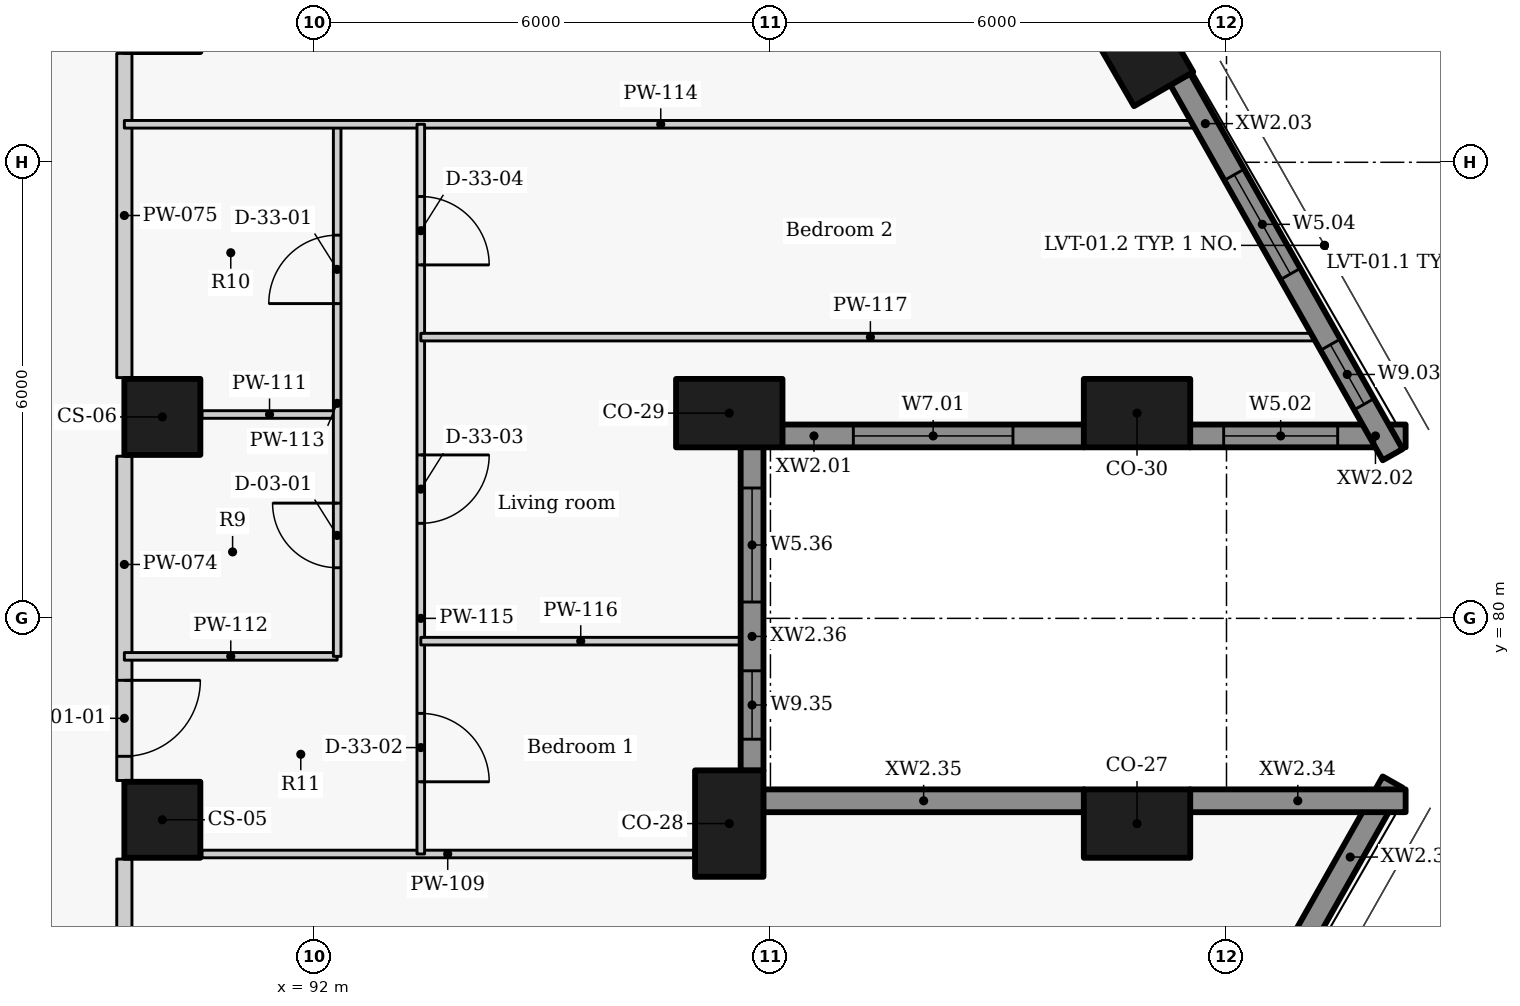
"""IFC4 building model, lengths in metres.
Left out: names, types, materials, properties, quantities, classifications, styles, units other than length and angle.
Written with IfcOpenShell. Run it as: python <this file> out.ifc"""

import sys

from ifc_helpers import new_model, si_unit, direction, frame, frame_2d, origin, origin_2d, place, context, subcontext, project, spatial, rectangle, extrude, element, fill, save


model = new_model("IFC4")
c1 = context("Model", 3, precision=1e-05, world=origin(), true_north=direction((0.0, 1.0)))
c2 = subcontext(c1, "Body", "Model", "MODEL_VIEW")
j1 = project(units=[si_unit("LENGTHUNIT", "METRE"), si_unit("PLANEANGLEUNIT", "RADIAN")], contexts=[c1])
p1 = place(None, origin())
s1 = spatial("IfcSite", under=j1, at=p1, CompositionType="ELEMENT")
p2 = place(p1, origin())
s2 = spatial("IfcBuilding", under=s1, at=p2, CompositionType="ELEMENT")
p3 = place(p2, frame((0.0, 0.0, 97.5)))
s3 = spatial("IfcBuildingStorey", under=s2, at=p3, CompositionType="ELEMENT", Elevation=97.5)
for number, where, z_axis, x_axis in (
    (1, (102.823, 77.3, 0.0), (0.0, 0.0, 1.0), (-1.0, 0.0, 0.0)),
    (2, (97.458, 77.3, 0.0), (0.0, 0.0, 1.0), (0.0, 1.0, 0.0)),
    (3, (97.458, 82.7, 0.0), (0.0, 0.0, 1.0), (1.0, 0.0, 0.0)),
    (4, (102.823, 82.7, 0.0), (0.0, 0.0, 1.0), (1.0, 0.0, 0.0)),
    (5, (102.823, 87.57, 0.0), (0.0, 0.0, 1.0), (-0.5, 0.866, 0.0)),
):
    element("IfcColumn", number, at=place(p3, frame(where, z_axis=z_axis, x_axis=x_axis)), inside=s3, PredefinedType="COLUMN", context=c2, shape_type="SweptSolid", body=[
        extrude(rectangle(XDim=1.4, YDim=0.9, at=origin_2d()), origin(), (0.0, 0.0, 1.0), 3.3),
    ])
for number, where, z_axis, x_axis in (
    (6, (90.0, 77.35, 0.0), (0.0, 0.0, 1.0), (0.0, 1.0, 0.0)),
    (7, (90.0, 82.65, 0.0), (0.0, 0.0, 1.0), (0.0, 1.0, 0.0)),
):
    element("IfcColumn", number, at=place(p3, frame(where, z_axis=z_axis, x_axis=x_axis)), inside=s3, PredefinedType="COLUMN", context=c2, shape_type="SweptSolid", body=[
        extrude(rectangle(XDim=1.0, YDim=1.0, at=origin_2d()), origin(), (0.0, 0.0, 1.0), 3.3),
    ])
p4 = place(p3, frame((98.154, 82.4, 0.0), z_axis=(0.0, 0.0, 1.0), x_axis=(1.0, 0.0, 0.0)))
e8 = element("IfcWall", 8, at=p4, inside=s3, PredefinedType="SOLIDWALL", context=c2, shape_type="SweptSolid", body=[
    extrude(rectangle(XDim=3.973, YDim=0.3, at=frame_2d((1.986, 0.0))), origin(), (0.0, 0.0, 1.0), 2.425),
])
p5 = place(p4, frame((0.936, 0.0, 0.9)))
e9 = element("IfcOpeningElement", 9, at=p5, cuts=e8, PredefinedType="OPENING", context=c2, shape_type="SweptSolid", body=[
    extrude(rectangle(XDim=2.1, YDim=1.1, at=frame_2d((1.05, 0.55))), frame((0.0, 0.16, 0.0), z_axis=(0.0, -1.0, 0.0), x_axis=(1.0, 0.0, 0.0)), (0.0, 0.0, 1.0), 0.32),
])
p6 = place(p3, frame((103.519, 82.4, 0.0), z_axis=(0.0, 0.0, 1.0), x_axis=(1.0, 0.0, 0.0)))
e10 = element("IfcWall", 10, at=p6, inside=s3, PredefinedType="SOLIDWALL", context=c2, shape_type="SweptSolid", body=[
    extrude(rectangle(XDim=2.838, YDim=0.3, at=frame_2d((1.419, 0.0))), origin(), (0.0, 0.0, 1.0), 2.425),
])
p7 = place(p6, frame((0.444, 0.0, 0.9)))
e11 = element("IfcOpeningElement", 11, at=p7, cuts=e10, PredefinedType="OPENING", context=c2, shape_type="SweptSolid", body=[
    extrude(rectangle(XDim=1.5, YDim=1.1, at=frame_2d((0.75, 0.55))), frame((0.0, 0.16, 0.0), z_axis=(0.0, -1.0, 0.0), x_axis=(1.0, 0.0, 0.0)), (0.0, 0.0, 1.0), 0.32),
])
p8 = place(p3, frame((106.186, 82.153, 0.0), z_axis=(0.0, 0.0, 1.0), x_axis=(-0.492456858874, 0.870336855561, 0.0)))
e12 = element("IfcWall", 12, at=p8, inside=s3, PredefinedType="SOLIDWALL", context=c2, shape_type="SweptSolid", body=[
    extrude(rectangle(XDim=5.677, YDim=0.3, at=frame_2d((2.838, 0.0))), origin(), (0.0, 0.0, 1.0), 2.425),
])
p9 = place(p8, frame((0.763, 0.0, 0.9)))
e13 = element("IfcOpeningElement", 13, at=p9, cuts=e12, PredefinedType="OPENING", context=c2, shape_type="SweptSolid", body=[
    extrude(rectangle(XDim=0.9, YDim=1.1, at=frame_2d((0.45, 0.55))), frame((0.0, 0.16, 0.0), z_axis=(0.0, -1.0, 0.0), x_axis=(1.0, 0.0, 0.0)), (0.0, 0.0, 1.0), 0.32),
])
p10 = place(p8, frame((2.732, 0.0, 0.9)))
e14 = element("IfcOpeningElement", 14, at=p10, cuts=e12, PredefinedType="OPENING", context=c2, shape_type="SweptSolid", body=[
    extrude(rectangle(XDim=1.5, YDim=1.1, at=frame_2d((0.75, 0.55))), frame((0.0, 0.16, 0.0), z_axis=(0.0, -1.0, 0.0), x_axis=(1.0, 0.0, 0.0)), (0.0, 0.0, 1.0), 0.32),
])
p11 = place(p3, frame((103.391, 72.906, 0.0), z_axis=(0.0, 0.0, 1.0), x_axis=(0.492456858874, 0.870336855561, 0.0)))
e15 = element("IfcWall", 15, at=p11, inside=s3, PredefinedType="SOLIDWALL", context=c2, shape_type="SweptSolid", body=[
    extrude(rectangle(XDim=5.677, YDim=0.3, at=frame_2d((2.838, 0.0))), origin(), (0.0, 0.0, 1.0), 2.425),
])
p12 = place(p11, frame((1.209, 0.0, 0.9)))
e16 = element("IfcOpeningElement", 16, at=p12, cuts=e15, PredefinedType="OPENING", context=c2, shape_type="SweptSolid", body=[
    extrude(rectangle(XDim=2.1, YDim=1.1, at=frame_2d((1.05, 0.55))), frame((0.0, 0.16, 0.0), z_axis=(0.0, -1.0, 0.0), x_axis=(1.0, 0.0, 0.0)), (0.0, 0.0, 1.0), 0.32),
])
p13 = place(p3, frame((106.357, 77.6, 0.0), z_axis=(0.0, 0.0, 1.0), x_axis=(-1.0, 0.0, 0.0)))
e17 = element("IfcWall", 17, at=p13, inside=s3, PredefinedType="SOLIDWALL", context=c2, shape_type="SweptSolid", body=[
    extrude(rectangle(XDim=2.838, YDim=0.3, at=frame_2d((1.419, 0.0))), origin(), (0.0, 0.0, 1.0), 2.425),
])
p14 = place(p3, frame((102.127, 77.6, 0.0), z_axis=(0.0, 0.0, 1.0), x_axis=(-1.0, 0.0, 0.0)))
e18 = element("IfcWall", 18, at=p14, inside=s3, PredefinedType="SOLIDWALL", context=c2, shape_type="SweptSolid", body=[
    extrude(rectangle(XDim=4.223, YDim=0.3, at=frame_2d((2.111, 0.0))), origin(), (0.0, 0.0, 1.0), 2.425),
])
p15 = place(p3, frame((97.758, 77.996, 0.0), z_axis=(0.0, 0.0, 1.0), x_axis=(0.0, 1.0, 0.0)))
e19 = element("IfcWall", 19, at=p15, inside=s3, PredefinedType="SOLIDWALL", context=c2, shape_type="SweptSolid", body=[
    extrude(rectangle(XDim=4.258, YDim=0.3, at=frame_2d((2.129, 0.0))), origin(), (0.0, 0.0, 1.0), 2.425),
])
p16 = place(p15, frame((0.414, 0.0, 0.9)))
e20 = element("IfcOpeningElement", 20, at=p16, cuts=e19, PredefinedType="OPENING", context=c2, shape_type="SweptSolid", body=[
    extrude(rectangle(XDim=0.9, YDim=1.1, at=frame_2d((0.45, 0.55))), frame((0.0, 0.16, 0.0), z_axis=(0.0, -1.0, 0.0), x_axis=(1.0, 0.0, 0.0)), (0.0, 0.0, 1.0), 0.32),
])
p17 = place(p15, frame((2.219, 0.0, 0.9)))
e21 = element("IfcOpeningElement", 21, at=p17, cuts=e19, PredefinedType="OPENING", context=c2, shape_type="SweptSolid", body=[
    extrude(rectangle(XDim=1.5, YDim=1.1, at=frame_2d((0.75, 0.55))), frame((0.0, 0.16, 0.0), z_axis=(0.0, -1.0, 0.0), x_axis=(1.0, 0.0, 0.0)), (0.0, 0.0, 1.0), 0.32),
])
p18 = place(p3, frame((89.5, 76.833, 0.0), z_axis=(0.0, 0.0, 1.0), x_axis=(0.0, -1.0, 0.0)))
e22 = element("IfcWall", 22, at=p18, inside=s3, PredefinedType="PARTITIONING", context=c2, shape_type="SweptSolid", body=[
    extrude(rectangle(XDim=4.266, YDim=0.2, at=frame_2d((2.133, 0.0))), origin(), (0.0, 0.0, 1.0), 3.025),
])
p19 = place(p18, frame((1.633, 0.0, 0.0)))
e23 = element("IfcOpeningElement", 23, at=p19, cuts=e22, PredefinedType="OPENING", context=c2, shape_type="SweptSolid", body=[
    extrude(rectangle(XDim=1.0, YDim=2.1, at=frame_2d((0.5, 1.05))), frame((0.0, 0.11, 0.0), z_axis=(0.0, -1.0, 0.0), x_axis=(1.0, 0.0, 0.0)), (0.0, 0.0, 1.0), 0.22),
])
p20 = place(p3, frame((89.5, 82.133, 0.0), z_axis=(0.0, 0.0, 1.0), x_axis=(0.0, -1.0, 0.0)))
e24 = element("IfcWall", 24, at=p20, inside=s3, PredefinedType="PARTITIONING", context=c2, shape_type="SweptSolid", body=[
    extrude(rectangle(XDim=4.266, YDim=0.2, at=frame_2d((2.133, 0.0))), origin(), (0.0, 0.0, 1.0), 3.025),
])
p21 = place(p20, frame((2.948, 0.0, 0.0)))
e25 = element("IfcOpeningElement", 25, at=p21, cuts=e24, PredefinedType="OPENING", context=c2, shape_type="SweptSolid", body=[
    extrude(rectangle(XDim=1.0, YDim=2.1, at=frame_2d((0.5, 1.05))), frame((0.0, 0.11, 0.0), z_axis=(0.0, -1.0, 0.0), x_axis=(1.0, 0.0, 0.0)), (0.0, 0.0, 1.0), 0.22),
])
p22 = place(p3, frame((89.5, 83.167, 0.0), z_axis=(0.0, 0.0, 1.0), x_axis=(0.0, 1.0, 0.0)))
e26 = element("IfcWall", 26, at=p22, inside=s3, PredefinedType="PARTITIONING", context=c2, shape_type="SweptSolid", body=[
    extrude(rectangle(XDim=4.266, YDim=0.2, at=frame_2d((2.133, 0.0))), origin(), (0.0, 0.0, 1.0), 3.025),
])
p23 = place(p3, frame((90.52, 76.9, 0.0), z_axis=(0.0, 0.0, 1.0), x_axis=(1.0, 0.0, 0.0)))
e27 = element("IfcWall", 27, at=p23, inside=s3, PredefinedType="PARTITIONING", context=c2, shape_type="SweptSolid", body=[
    extrude(rectangle(XDim=6.468, YDim=0.1, at=frame_2d((3.234, 0.0))), origin(), (0.0, 0.0, 1.0), 3.025),
])
p24 = place(p3, frame((90.52, 82.682, 0.0), z_axis=(0.0, 0.0, 1.0), x_axis=(1.0, 0.0, 0.0)))
e28 = element("IfcWall", 28, at=p24, inside=s3, PredefinedType="PARTITIONING", context=c2, shape_type="SweptSolid", body=[
    extrude(rectangle(XDim=1.78, YDim=0.1, at=frame_2d((0.89, 0.0))), origin(), (0.0, 0.0, 1.0), 3.025),
])
p25 = place(p3, frame((89.5, 79.5, 0.0), z_axis=(0.0, 0.0, 1.0), x_axis=(1.0, 0.0, 0.0)))
e29 = element("IfcWall", 29, at=p25, inside=s3, PredefinedType="PARTITIONING", context=c2, shape_type="SweptSolid", body=[
    extrude(rectangle(XDim=2.8, YDim=0.1, at=frame_2d((1.4, 0.0))), origin(), (0.0, 0.0, 1.0), 2.505),
])
p26 = place(p3, frame((92.3, 79.5, 0.0), z_axis=(0.0, 0.0, 1.0), x_axis=(0.0, 1.0, 0.0)))
e30 = element("IfcWall", 30, at=p26, inside=s3, PredefinedType="PARTITIONING", context=c2, shape_type="SweptSolid", body=[
    extrude(rectangle(XDim=7.0, YDim=0.1, at=frame_2d((3.5, 0.0))), origin(), (0.0, 0.0, 1.0), 3.025),
])
p27 = place(p26, frame((1.166, 0.0, 0.0)))
e31 = element("IfcOpeningElement", 31, at=p27, cuts=e30, PredefinedType="OPENING", context=c2, shape_type="SweptSolid", body=[
    extrude(rectangle(XDim=0.85, YDim=2.1, at=frame_2d((0.425, 1.05))), frame((0.0, 0.06, 0.0), z_axis=(0.0, -1.0, 0.0), x_axis=(1.0, 0.0, 0.0)), (0.0, 0.0, 1.0), 0.12),
])
p28 = place(p26, frame((4.641, 0.0, 0.0)))
e32 = element("IfcOpeningElement", 32, at=p28, cuts=e30, PredefinedType="OPENING", context=c2, shape_type="SweptSolid", body=[
    extrude(rectangle(XDim=0.9, YDim=2.1, at=frame_2d((0.45, 1.05))), frame((0.0, 0.06, 0.0), z_axis=(0.0, -1.0, 0.0), x_axis=(1.0, 0.0, 0.0)), (0.0, 0.0, 1.0), 0.12),
])
p29 = place(p3, frame((89.5, 86.5, 0.0), z_axis=(0.0, 0.0, 1.0), x_axis=(1.0, 0.0, 0.0)))
e33 = element("IfcWall", 33, at=p29, inside=s3, PredefinedType="PARTITIONING", context=c2, shape_type="SweptSolid", body=[
    extrude(rectangle(XDim=14.114, YDim=0.1, at=frame_2d((7.057, 0.0))), origin(), (0.0, 0.0, 1.0), 2.405),
])
p30 = place(p3, frame((93.4, 86.5, 0.0), z_axis=(0.0, 0.0, 1.0), x_axis=(0.0, -1.0, 0.0)))
e34 = element("IfcWall", 34, at=p30, inside=s3, PredefinedType="PARTITIONING", context=c2, shape_type="SweptSolid", body=[
    extrude(rectangle(XDim=9.6, YDim=0.1, at=frame_2d((4.8, 0.0))), origin(), (0.0, 0.0, 1.0), 3.025),
])
p31 = place(p30, frame((7.75, 0.0, 0.0)))
e35 = element("IfcOpeningElement", 35, at=p31, cuts=e34, PredefinedType="OPENING", context=c2, shape_type="SweptSolid", body=[
    extrude(rectangle(XDim=0.9, YDim=2.1, at=frame_2d((0.45, 1.05))), frame((0.0, 0.06, 0.0), z_axis=(0.0, -1.0, 0.0), x_axis=(1.0, 0.0, 0.0)), (0.0, 0.0, 1.0), 0.12),
])
p32 = place(p30, frame((4.35, 0.0, 0.0)))
e36 = element("IfcOpeningElement", 36, at=p32, cuts=e34, PredefinedType="OPENING", context=c2, shape_type="SweptSolid", body=[
    extrude(rectangle(XDim=0.9, YDim=2.1, at=frame_2d((0.45, 1.05))), frame((0.0, 0.06, 0.0), z_axis=(0.0, -1.0, 0.0), x_axis=(1.0, 0.0, 0.0)), (0.0, 0.0, 1.0), 0.12),
])
p33 = place(p30, frame((0.95, 0.0, 0.0)))
e37 = element("IfcOpeningElement", 37, at=p33, cuts=e34, PredefinedType="OPENING", context=c2, shape_type="SweptSolid", body=[
    extrude(rectangle(XDim=0.9, YDim=2.1, at=frame_2d((0.45, 1.05))), frame((0.0, 0.06, 0.0), z_axis=(0.0, -1.0, 0.0), x_axis=(1.0, 0.0, 0.0)), (0.0, 0.0, 1.0), 0.12),
])
p34 = place(p3, frame((93.4, 79.7, 0.0), z_axis=(0.0, 0.0, 1.0), x_axis=(1.0, 0.0, 0.0)))
e38 = element("IfcWall", 38, at=p34, inside=s3, PredefinedType="PARTITIONING", context=c2, shape_type="SweptSolid", body=[
    extrude(rectangle(XDim=4.208, YDim=0.1, at=frame_2d((2.104, 0.0))), origin(), (0.0, 0.0, 1.0), 2.405),
])
p35 = place(p3, frame((93.4, 83.7, 0.0), z_axis=(0.0, 0.0, 1.0), x_axis=(1.0, 0.0, 0.0)))
e39 = element("IfcWall", 39, at=p35, inside=s3, PredefinedType="PARTITIONING", context=c2, shape_type="SweptSolid", body=[
    extrude(rectangle(XDim=11.83, YDim=0.1, at=frame_2d((5.915, 0.0))), origin(), (0.0, 0.0, 1.0), 2.405),
])
p36 = place(p5, origin())
e40 = element("IfcWindow", 40, at=p36, inside=s3, PartitioningType="SINGLE_PANEL", PredefinedType="WINDOW", context=c2, shape_type="SweptSolid", body=[
    extrude(rectangle(XDim=2.1, YDim=1.1, at=frame_2d((1.05, 0.55))), frame((0.0, 0.03, 0.0), z_axis=(0.0, -1.0, 0.0), x_axis=(1.0, 0.0, 0.0)), (0.0, 0.0, 1.0), 0.06),
])
fill(e9, e40)
p37 = place(p7, origin())
e41 = element("IfcWindow", 41, at=p37, inside=s3, PartitioningType="SINGLE_PANEL", PredefinedType="WINDOW", context=c2, shape_type="SweptSolid", body=[
    extrude(rectangle(XDim=1.5, YDim=1.1, at=frame_2d((0.75, 0.55))), frame((0.0, 0.03, 0.0), z_axis=(0.0, -1.0, 0.0), x_axis=(1.0, 0.0, 0.0)), (0.0, 0.0, 1.0), 0.06),
])
fill(e11, e41)
p38 = place(p9, origin())
e42 = element("IfcWindow", 42, at=p38, inside=s3, PartitioningType="SINGLE_PANEL", PredefinedType="WINDOW", context=c2, shape_type="SweptSolid", body=[
    extrude(rectangle(XDim=0.9, YDim=1.1, at=frame_2d((0.45, 0.55))), frame((0.0, 0.03, 0.0), z_axis=(0.0, -1.0, 0.0), x_axis=(1.0, 0.0, 0.0)), (0.0, 0.0, 1.0), 0.06),
])
fill(e13, e42)
p39 = place(p10, origin())
e43 = element("IfcWindow", 43, at=p39, inside=s3, PartitioningType="SINGLE_PANEL", PredefinedType="WINDOW", context=c2, shape_type="SweptSolid", body=[
    extrude(rectangle(XDim=1.5, YDim=1.1, at=frame_2d((0.75, 0.55))), frame((0.0, 0.03, 0.0), z_axis=(0.0, -1.0, 0.0), x_axis=(1.0, 0.0, 0.0)), (0.0, 0.0, 1.0), 0.06),
])
fill(e14, e43)
p40 = place(p16, origin())
e44 = element("IfcWindow", 44, at=p40, inside=s3, PartitioningType="SINGLE_PANEL", PredefinedType="WINDOW", context=c2, shape_type="SweptSolid", body=[
    extrude(rectangle(XDim=0.9, YDim=1.1, at=frame_2d((0.45, 0.55))), frame((0.0, 0.03, 0.0), z_axis=(0.0, -1.0, 0.0), x_axis=(1.0, 0.0, 0.0)), (0.0, 0.0, 1.0), 0.06),
])
fill(e20, e44)
p41 = place(p17, origin())
e45 = element("IfcWindow", 45, at=p41, inside=s3, PartitioningType="SINGLE_PANEL", PredefinedType="WINDOW", context=c2, shape_type="SweptSolid", body=[
    extrude(rectangle(XDim=1.5, YDim=1.1, at=frame_2d((0.75, 0.55))), frame((0.0, 0.03, 0.0), z_axis=(0.0, -1.0, 0.0), x_axis=(1.0, 0.0, 0.0)), (0.0, 0.0, 1.0), 0.06),
])
fill(e21, e45)
p42 = place(p21, origin())
e46 = element("IfcDoor", 46, at=p42, inside=s3, OperationType="SINGLE_SWING_LEFT", PredefinedType="DOOR", context=c2, shape_type="SweptSolid", body=[
    extrude(rectangle(XDim=1.0, YDim=2.1, at=frame_2d((0.5, 1.05))), frame((0.0, 0.025, 0.0), z_axis=(0.0, -1.0, 0.0), x_axis=(1.0, 0.0, 0.0)), (0.0, 0.0, 1.0), 0.05),
])
fill(e25, e46)
p43 = place(p27, origin())
e47 = element("IfcDoor", 47, at=p43, inside=s3, OperationType="SINGLE_SWING_RIGHT", PredefinedType="DOOR", context=c2, shape_type="SweptSolid", body=[
    extrude(rectangle(XDim=0.85, YDim=2.1, at=frame_2d((0.425, 1.05))), frame((0.0, 0.025, 0.0), z_axis=(0.0, -1.0, 0.0), x_axis=(1.0, 0.0, 0.0)), (0.0, 0.0, 1.0), 0.05),
])
fill(e31, e47)
p44 = place(p28, origin())
e48 = element("IfcDoor", 48, at=p44, inside=s3, OperationType="SINGLE_SWING_LEFT", PredefinedType="DOOR", context=c2, shape_type="SweptSolid", body=[
    extrude(rectangle(XDim=0.9, YDim=2.1, at=frame_2d((0.45, 1.05))), frame((0.0, 0.025, 0.0), z_axis=(0.0, -1.0, 0.0), x_axis=(1.0, 0.0, 0.0)), (0.0, 0.0, 1.0), 0.05),
])
fill(e32, e48)
p45 = place(p31, origin())
e49 = element("IfcDoor", 49, at=p45, inside=s3, OperationType="SINGLE_SWING_RIGHT", PredefinedType="DOOR", context=c2, shape_type="SweptSolid", body=[
    extrude(rectangle(XDim=0.9, YDim=2.1, at=frame_2d((0.45, 1.05))), frame((0.0, 0.025, 0.0), z_axis=(0.0, -1.0, 0.0), x_axis=(1.0, 0.0, 0.0)), (0.0, 0.0, 1.0), 0.05),
])
fill(e35, e49)
p46 = place(p32, origin())
e50 = element("IfcDoor", 50, at=p46, inside=s3, OperationType="SINGLE_SWING_LEFT", PredefinedType="DOOR", context=c2, shape_type="SweptSolid", body=[
    extrude(rectangle(XDim=0.9, YDim=2.1, at=frame_2d((0.45, 1.05))), frame((0.0, 0.025, 0.0), z_axis=(0.0, -1.0, 0.0), x_axis=(1.0, 0.0, 0.0)), (0.0, 0.0, 1.0), 0.05),
])
fill(e36, e50)
p47 = place(p33, origin())
e51 = element("IfcDoor", 51, at=p47, inside=s3, OperationType="SINGLE_SWING_RIGHT", PredefinedType="DOOR", context=c2, shape_type="SweptSolid", body=[
    extrude(rectangle(XDim=0.9, YDim=2.1, at=frame_2d((0.45, 1.05))), frame((0.0, 0.025, 0.0), z_axis=(0.0, -1.0, 0.0), x_axis=(1.0, 0.0, 0.0)), (0.0, 0.0, 1.0), 0.05),
])
fill(e37, e51)
save(model, sys.argv[1])
